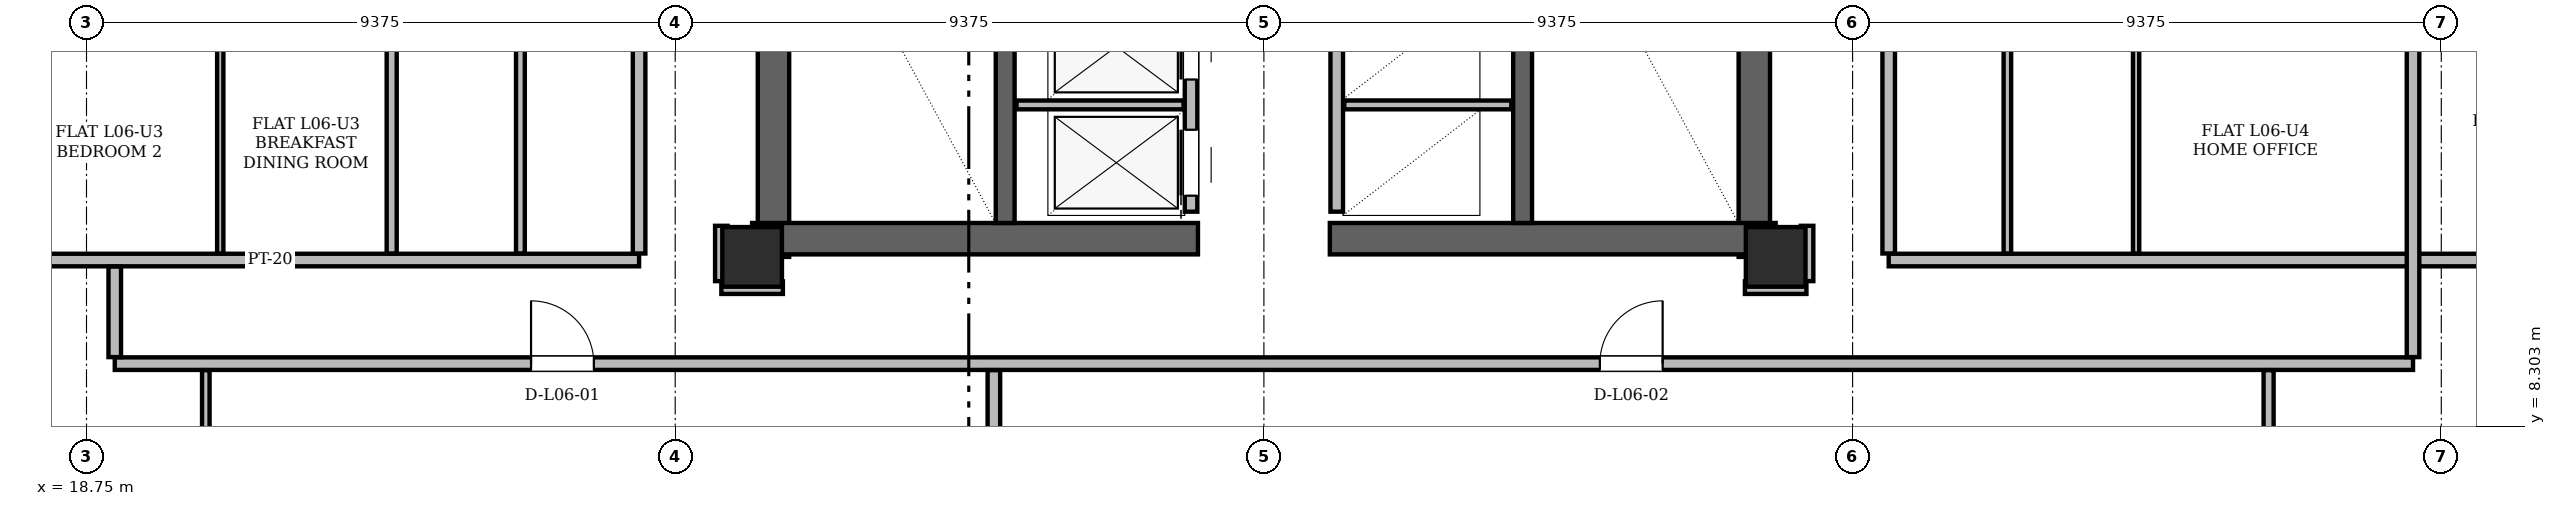
"""IFC4 building model, lengths in metres.
Left out: names, types, materials, properties, quantities, classifications, styles, units other than length and angle.
Written with IfcOpenShell. Run it as: python <this file> out.ifc"""

import sys

from ifc_helpers import new_model, si_unit, direction, frame, frame_2d, origin, origin_2d, place, context, subcontext, project, spatial, rectangle, hollow_rectangle, extrude, element, fill, save


model = new_model("IFC4")
c1 = context("Model", 3, precision=1e-05, world=origin(), true_north=direction((0.0, 1.0)))
c2 = subcontext(c1, "Body", "Model", "MODEL_VIEW")
j1 = project(units=[si_unit("LENGTHUNIT", "METRE"), si_unit("PLANEANGLEUNIT", "RADIAN")], contexts=[c1])
p1 = place(None, origin())
s1 = spatial("IfcSite", under=j1, at=p1, CompositionType="ELEMENT")
p2 = place(p1, origin())
s2 = spatial("IfcBuilding", under=s1, at=p2, CompositionType="ELEMENT")
p3 = place(p2, frame((0.0, 0.0, 27.3)))
s3 = spatial("IfcBuildingStorey", under=s2, at=p3, CompositionType="ELEMENT", Elevation=27.3)
for number, where, z_axis, x_axis in (
    (1, (29.35, 11.0, 0.0), (0.0, 0.0, 1.0), (1.0, 0.0, 0.0)),
    (2, (45.65, 11.0, 0.0), (0.0, 0.0, 1.0), (1.0, 0.0, 0.0)),
):
    element("IfcColumn", number, at=place(p3, frame(where, z_axis=z_axis, x_axis=x_axis)), inside=s3, PredefinedType="COLUMN", context=c2, shape_type="SweptSolid", body=[
        extrude(hollow_rectangle(XDim=0.95, YDim=0.95, WallThickness=0.08, at=origin_2d()), origin(), (0.0, 0.0, 1.0), 3.6),
    ])
for number, where, z_axis, x_axis in (
    (3, (29.69, 11.0, 0.0), (0.0, 0.0, 1.0), (0.0, 1.0, 0.0)),
    (4, (45.31, 11.0, 0.0), (0.0, 0.0, 1.0), (0.0, 1.0, 0.0)),
):
    element("IfcWall", number, at=place(p3, frame(where, z_axis=z_axis, x_axis=x_axis)), inside=s3, PredefinedType="SHEAR", context=c2, shape_type="SweptSolid", body=[
        extrude(rectangle(XDim=13.3, YDim=0.5, at=frame_2d((6.65, 0.0))), origin(), (0.0, 0.0, 1.0), 3.36),
    ])
for number, where, z_axis, x_axis in (
    (5, (29.35, 11.29, 0.0), (0.0, 0.0, 1.0), (1.0, 0.0, 0.0)),
    (6, (38.55, 11.29, 0.0), (0.0, 0.0, 1.0), (1.0, 0.0, 0.0)),
):
    element("IfcWall", number, at=place(p3, frame(where, z_axis=z_axis, x_axis=x_axis)), inside=s3, PredefinedType="SHEAR", context=c2, shape_type="SweptSolid", body=[
        extrude(rectangle(XDim=7.1, YDim=0.5, at=frame_2d((3.55, 0.0))), origin(), (0.0, 0.0, 1.0), 3.36),
    ])
for number, where, z_axis, x_axis in (
    (7, (33.38, 11.54, 0.0), (0.0, 0.0, 1.0), (0.0, 1.0, 0.0)),
    (8, (41.62, 11.54, 0.0), (0.0, 0.0, 1.0), (0.0, 1.0, 0.0)),
):
    element("IfcWall", number, at=place(p3, frame(where, z_axis=z_axis, x_axis=x_axis)), inside=s3, PredefinedType="SHEAR", context=c2, shape_type="SweptSolid", body=[
        extrude(rectangle(XDim=7.62, YDim=0.3, at=frame_2d((3.81, 0.0))), origin(), (0.0, 0.0, 1.0), 3.36),
    ])
p4 = place(p3, frame((13.09, 15.3, 0.0), z_axis=(0.0, 0.0, 1.0), x_axis=(0.500005168208, -0.866022419898, 0.0)))
e9 = element("IfcWall", 9, at=p4, inside=s3, PredefinedType="SOLIDWALL", context=c2, shape_type="SweptSolid", body=[
    extrude(rectangle(XDim=16.096, YDim=0.34, at=frame_2d((8.048, 0.0))), origin(), (0.0, 0.0, 1.0), 2.494),
])
p5 = place(p4, frame((1.49, 0.0, 1.28)))
e10 = element("IfcOpeningElement", 10, at=p5, cuts=e9, PredefinedType="OPENING", context=c2, shape_type="SweptSolid", body=[
    extrude(rectangle(XDim=0.85, YDim=0.92, at=frame_2d((0.425, 0.46))), frame((0.0, 0.17, 0.0), z_axis=(0.0, -1.0, 0.0), x_axis=(1.0, 0.0, 0.0)), (0.0, 0.0, 1.0), 0.34),
])
p6 = place(p3, frame((53.862, 1.36, 0.0), z_axis=(0.0, 0.0, 1.0), x_axis=(0.500005168208, 0.866022419898, 0.0)))
e11 = element("IfcWall", 11, at=p6, inside=s3, PredefinedType="SOLIDWALL", context=c2, shape_type="SweptSolid", body=[
    extrude(rectangle(XDim=16.096, YDim=0.34, at=frame_2d((8.048, 0.0))), origin(), (0.0, 0.0, 1.0), 2.494),
])
p7 = place(p3, frame((36.34, 11.72, 0.0), z_axis=(0.0, 0.0, 1.0), x_axis=(0.0, 1.0, 0.0)))
e12 = element("IfcWall", 12, at=p7, inside=s3, PredefinedType="PARTITIONING", context=c2, shape_type="SweptSolid", body=[
    extrude(rectangle(XDim=7.6, YDim=0.2, at=frame_2d((3.8, 0.0))), origin(), (0.0, 0.0, 1.0), 3.36),
])
p8 = place(p7, frame((0.255, 0.0, 0.0)))
e13 = element("IfcOpeningElement", 13, at=p8, cuts=e12, PredefinedType="OPENING", context=c2, shape_type="SweptSolid", body=[
    extrude(rectangle(XDim=1.05, YDim=2.15, at=frame_2d((0.525, 1.075))), frame((0.0, 0.1, 0.0), z_axis=(0.0, -1.0, 0.0), x_axis=(1.0, 0.0, 0.0)), (0.0, 0.0, 1.0), 0.2),
])
p9 = place(p7, frame((2.105, 0.0, 0.0)))
e14 = element("IfcOpeningElement", 14, at=p9, cuts=e12, PredefinedType="OPENING", context=c2, shape_type="SweptSolid", body=[
    extrude(rectangle(XDim=1.05, YDim=2.15, at=frame_2d((0.525, 1.075))), frame((0.0, 0.1, 0.0), z_axis=(0.0, -1.0, 0.0), x_axis=(1.0, 0.0, 0.0)), (0.0, 0.0, 1.0), 0.2),
])
p10 = place(p7, frame((3.955, 0.0, 0.0)))
e15 = element("IfcOpeningElement", 15, at=p10, cuts=e12, PredefinedType="OPENING", context=c2, shape_type="SweptSolid", body=[
    extrude(rectangle(XDim=1.05, YDim=2.15, at=frame_2d((0.525, 1.075))), frame((0.0, 0.1, 0.0), z_axis=(0.0, -1.0, 0.0), x_axis=(1.0, 0.0, 0.0)), (0.0, 0.0, 1.0), 0.2),
])
p11 = place(p3, frame((33.56, 13.42, 0.0), z_axis=(0.0, 0.0, 1.0), x_axis=(1.0, 0.0, 0.0)))
e16 = element("IfcWall", 16, at=p11, inside=s3, PredefinedType="PARTITIONING", context=c2, shape_type="SweptSolid", body=[
    extrude(rectangle(XDim=2.66, YDim=0.14, at=frame_2d((1.33, 0.0))), origin(), (0.0, 0.0, 1.0), 3.36),
])
p12 = place(p3, frame((38.66, 11.72, 0.0), z_axis=(0.0, 0.0, 1.0), x_axis=(0.0, 1.0, 0.0)))
e17 = element("IfcWall", 17, at=p12, inside=s3, PredefinedType="PARTITIONING", context=c2, shape_type="SweptSolid", body=[
    extrude(rectangle(XDim=9.1, YDim=0.2, at=frame_2d((4.55, 0.0))), origin(), (0.0, 0.0, 1.0), 3.36),
])
p13 = place(p3, frame((38.78, 13.42, 0.0), z_axis=(0.0, 0.0, 1.0), x_axis=(1.0, 0.0, 0.0)))
e18 = element("IfcWall", 18, at=p13, inside=s3, PredefinedType="PARTITIONING", context=c2, shape_type="SweptSolid", body=[
    extrude(rectangle(XDim=2.66, YDim=0.14, at=frame_2d((1.33, 0.0))), origin(), (0.0, 0.0, 1.0), 3.36),
])
p14 = place(p3, frame((19.2, 9.3, 0.0), z_axis=(0.0, 0.0, 1.0), x_axis=(1.0, 0.0, 0.0)))
e19 = element("IfcWall", 19, at=p14, inside=s3, PredefinedType="PARTITIONING", context=c2, shape_type="SweptSolid", body=[
    extrude(rectangle(XDim=36.6, YDim=0.2, at=frame_2d((18.3, 0.0))), origin(), (0.0, 0.0, 1.0), 2.738),
])
p15 = place(p14, frame((6.629, 0.0, 0.0)))
e20 = element("IfcOpeningElement", 20, at=p15, cuts=e19, PredefinedType="OPENING", context=c2, shape_type="SweptSolid", body=[
    extrude(rectangle(XDim=1.0, YDim=2.18, at=frame_2d((0.5, 1.09))), frame((0.0, 0.1, 0.0), z_axis=(0.0, -1.0, 0.0), x_axis=(1.0, 0.0, 0.0)), (0.0, 0.0, 1.0), 0.2),
])
p16 = place(p14, frame((23.65, 0.0, 0.0)))
e21 = element("IfcOpeningElement", 21, at=p16, cuts=e19, PredefinedType="OPENING", context=c2, shape_type="SweptSolid", body=[
    extrude(rectangle(XDim=1.0, YDim=2.18, at=frame_2d((0.5, 1.09))), frame((0.0, 0.1, 0.0), z_axis=(0.0, -1.0, 0.0), x_axis=(1.0, 0.0, 0.0)), (0.0, 0.0, 1.0), 0.2),
])
for number, where, z_axis, x_axis in (
    (22, (28.86, 10.51, 0.0), (0.0, 0.0, 1.0), (1.0, 0.0, 0.0)),
    (23, (45.16, 10.51, 0.0), (0.0, 0.0, 1.0), (1.0, 0.0, 0.0)),
):
    element("IfcWall", number, at=place(p3, frame(where, z_axis=z_axis, x_axis=x_axis)), inside=s3, PredefinedType="PARTITIONING", context=c2, shape_type="SweptSolid", body=[
        extrude(rectangle(XDim=0.98, YDim=0.2, at=frame_2d((0.49, 0.0))), origin(), (0.0, 0.0, 1.0), 2.738),
    ])
for number, where, z_axis, x_axis in (
    (24, (15.802, 10.95, 0.0), (0.0, 0.0, 1.0), (1.0, 0.0, 0.0)),
    (25, (47.45, 10.95, 0.0), (0.0, 0.0, 1.0), (1.0, 0.0, 0.0)),
):
    element("IfcWall", number, at=place(p3, frame(where, z_axis=z_axis, x_axis=x_axis)), inside=s3, PredefinedType="PARTITIONING", context=c2, shape_type="SweptSolid", body=[
        extrude(rectangle(XDim=11.748, YDim=0.2, at=frame_2d((5.874, 0.0))), origin(), (0.0, 0.0, 1.0), 3.36),
    ])
p17 = place(p3, frame((19.2, 9.404, 0.0), z_axis=(0.0, 0.0, 1.0), x_axis=(0.0, 1.0, 0.0)))
e26 = element("IfcWall", 26, at=p17, inside=s3, PredefinedType="PARTITIONING", context=c2, shape_type="SweptSolid", body=[
    extrude(rectangle(XDim=1.442, YDim=0.2, at=frame_2d((0.721, 0.0))), origin(), (0.0, 0.0, 1.0), 3.36),
])
p18 = place(p3, frame((20.65, 2.553, 0.0), z_axis=(0.0, 0.0, 1.0), x_axis=(0.0, 1.0, 0.0)))
e27 = element("IfcWall", 27, at=p18, inside=s3, PredefinedType="PARTITIONING", context=c2, shape_type="SweptSolid", body=[
    extrude(rectangle(XDim=6.643, YDim=0.12, at=frame_2d((3.322, 0.0))), origin(), (0.0, 0.0, 1.0), 3.36),
])
p19 = place(p18, frame((2.904, 0.0, 0.0)))
e28 = element("IfcOpeningElement", 28, at=p19, cuts=e27, PredefinedType="OPENING", context=c2, shape_type="SweptSolid", body=[
    extrude(rectangle(XDim=0.88, YDim=2.08, at=frame_2d((0.44, 1.04))), frame((0.0, 0.06, 0.0), z_axis=(0.0, -1.0, 0.0), x_axis=(1.0, 0.0, 0.0)), (0.0, 0.0, 1.0), 0.12),
])
p20 = place(p3, frame((20.88, 11.054, 0.0), z_axis=(0.0, 0.0, 1.0), x_axis=(0.0, 1.0, 0.0)))
e29 = element("IfcWall", 29, at=p20, inside=s3, PredefinedType="PARTITIONING", context=c2, shape_type="SweptSolid", body=[
    extrude(rectangle(XDim=4.642, YDim=0.1, at=frame_2d((2.321, 0.0))), origin(), (0.0, 0.0, 1.0), 2.738),
])
p21 = place(p3, frame((23.61, 11.054, 0.0), z_axis=(0.0, 0.0, 1.0), x_axis=(0.0, 1.0, 0.0)))
e30 = element("IfcWall", 30, at=p21, inside=s3, PredefinedType="PARTITIONING", context=c2, shape_type="SweptSolid", body=[
    extrude(rectangle(XDim=4.642, YDim=0.16, at=frame_2d((2.321, 0.0))), origin(), (0.0, 0.0, 1.0), 2.738),
])
p22 = place(p3, frame((25.66, 11.054, 0.0), z_axis=(0.0, 0.0, 1.0), x_axis=(0.0, 1.0, 0.0)))
e31 = element("IfcWall", 31, at=p22, inside=s3, PredefinedType="PARTITIONING", context=c2, shape_type="SweptSolid", body=[
    extrude(rectangle(XDim=4.642, YDim=0.14, at=frame_2d((2.321, 0.0))), origin(), (0.0, 0.0, 1.0), 2.738),
])
p23 = place(p3, frame((27.55, 11.054, 0.0), z_axis=(0.0, 0.0, 1.0), x_axis=(0.0, 1.0, 0.0)))
e32 = element("IfcWall", 32, at=p23, inside=s3, PredefinedType="PARTITIONING", context=c2, shape_type="SweptSolid", body=[
    extrude(rectangle(XDim=14.812, YDim=0.2, at=frame_2d((7.406, 0.0))), origin(), (0.0, 0.0, 1.0), 2.738),
])
p24 = place(p23, frame((8.541, 0.0, 0.0)))
e33 = element("IfcOpeningElement", 33, at=p24, cuts=e32, PredefinedType="OPENING", context=c2, shape_type="SweptSolid", body=[
    extrude(rectangle(XDim=1.0, YDim=2.18, at=frame_2d((0.5, 1.09))), frame((0.0, 0.1, 0.0), z_axis=(0.0, -1.0, 0.0), x_axis=(1.0, 0.0, 0.0)), (0.0, 0.0, 1.0), 0.2),
])
p25 = place(p3, frame((28.86, 10.614, 0.0), z_axis=(0.0, 0.0, 1.0), x_axis=(0.0, 1.0, 0.0)))
e34 = element("IfcWall", 34, at=p25, inside=s3, PredefinedType="PARTITIONING", context=c2, shape_type="SweptSolid", body=[
    extrude(rectangle(XDim=0.881, YDim=0.2, at=frame_2d((0.44, 0.0))), origin(), (0.0, 0.0, 1.0), 2.738),
])
p26 = place(p3, frame((33.2, 1.534, 0.0), z_axis=(0.0, 0.0, 1.0), x_axis=(0.0, 1.0, 0.0)))
e35 = element("IfcWall", 35, at=p26, inside=s3, PredefinedType="PARTITIONING", context=c2, shape_type="SweptSolid", body=[
    extrude(rectangle(XDim=7.662, YDim=0.2, at=frame_2d((3.831, 0.0))), origin(), (0.0, 0.0, 1.0), 2.946),
])
p27 = place(p3, frame((46.15, 10.614, 0.0), z_axis=(0.0, 0.0, 1.0), x_axis=(0.0, 1.0, 0.0)))
e36 = element("IfcWall", 36, at=p27, inside=s3, PredefinedType="PARTITIONING", context=c2, shape_type="SweptSolid", body=[
    extrude(rectangle(XDim=0.881, YDim=0.2, at=frame_2d((0.44, 0.0))), origin(), (0.0, 0.0, 1.0), 2.738),
])
p28 = place(p3, frame((47.45, 11.054, 0.0), z_axis=(0.0, 0.0, 1.0), x_axis=(0.0, 1.0, 0.0)))
e37 = element("IfcWall", 37, at=p28, inside=s3, PredefinedType="PARTITIONING", context=c2, shape_type="SweptSolid", body=[
    extrude(rectangle(XDim=14.812, YDim=0.2, at=frame_2d((7.406, 0.0))), origin(), (0.0, 0.0, 1.0), 2.738),
])
p29 = place(p28, frame((8.541, 0.0, 0.0)))
e38 = element("IfcOpeningElement", 38, at=p29, cuts=e37, PredefinedType="OPENING", context=c2, shape_type="SweptSolid", body=[
    extrude(rectangle(XDim=1.0, YDim=2.18, at=frame_2d((0.5, 1.09))), frame((0.0, 0.1, 0.0), z_axis=(0.0, -1.0, 0.0), x_axis=(1.0, 0.0, 0.0)), (0.0, 0.0, 1.0), 0.2),
])
p30 = place(p3, frame((49.34, 11.054, 0.0), z_axis=(0.0, 0.0, 1.0), x_axis=(0.0, 1.0, 0.0)))
e39 = element("IfcWall", 39, at=p30, inside=s3, PredefinedType="PARTITIONING", context=c2, shape_type="SweptSolid", body=[
    extrude(rectangle(XDim=4.652, YDim=0.12, at=frame_2d((2.326, 0.0))), origin(), (0.0, 0.0, 1.0), 2.738),
])
p31 = place(p3, frame((51.39, 11.054, 0.0), z_axis=(0.0, 0.0, 1.0), x_axis=(0.0, 1.0, 0.0)))
e40 = element("IfcWall", 40, at=p31, inside=s3, PredefinedType="PARTITIONING", context=c2, shape_type="SweptSolid", body=[
    extrude(rectangle(XDim=4.652, YDim=0.1, at=frame_2d((2.326, 0.0))), origin(), (0.0, 0.0, 1.0), 2.738),
])
p32 = place(p3, frame((53.5, 1.828, 0.0), z_axis=(0.0, 0.0, 1.0), x_axis=(0.0, 1.0, 0.0)))
e41 = element("IfcWall", 41, at=p32, inside=s3, PredefinedType="PARTITIONING", context=c2, shape_type="SweptSolid", body=[
    extrude(rectangle(XDim=7.368, YDim=0.16, at=frame_2d((3.684, 0.0))), origin(), (0.0, 0.0, 1.0), 2.738),
])
p33 = place(p32, frame((3.137, 0.0, 0.0)))
e42 = element("IfcOpeningElement", 42, at=p33, cuts=e41, PredefinedType="OPENING", context=c2, shape_type="SweptSolid", body=[
    extrude(rectangle(XDim=0.88, YDim=2.08, at=frame_2d((0.44, 1.04))), frame((0.0, 0.08, 0.0), z_axis=(0.0, -1.0, 0.0), x_axis=(1.0, 0.0, 0.0)), (0.0, 0.0, 1.0), 0.16),
])
p34 = place(p3, frame((55.8, 9.404, 0.0), z_axis=(0.0, 0.0, 1.0), x_axis=(0.0, 1.0, 0.0)))
e43 = element("IfcWall", 43, at=p34, inside=s3, PredefinedType="PARTITIONING", context=c2, shape_type="SweptSolid", body=[
    extrude(rectangle(XDim=6.302, YDim=0.2, at=frame_2d((3.151, 0.0))), origin(), (0.0, 0.0, 1.0), 2.738),
])
p35 = place(p8, origin())
e44 = element("IfcDoor", 44, at=p35, inside=s3, OperationType="SLIDING_TO_LEFT", PredefinedType="DOOR", context=c2, shape_type="SweptSolid", body=[
    extrude(rectangle(XDim=1.05, YDim=2.15, at=frame_2d((0.525, 1.075))), frame((0.0, 0.025, 0.0), z_axis=(0.0, -1.0, 0.0), x_axis=(1.0, 0.0, 0.0)), (0.0, 0.0, 1.0), 0.05),
])
fill(e13, e44)
p36 = place(p9, origin())
e45 = element("IfcDoor", 45, at=p36, inside=s3, OperationType="SLIDING_TO_RIGHT", PredefinedType="DOOR", context=c2, shape_type="SweptSolid", body=[
    extrude(rectangle(XDim=1.05, YDim=2.15, at=frame_2d((0.525, 1.075))), frame((0.0, 0.025, 0.0), z_axis=(0.0, -1.0, 0.0), x_axis=(1.0, 0.0, 0.0)), (0.0, 0.0, 1.0), 0.05),
])
fill(e14, e45)
p37 = place(p15, origin())
e46 = element("IfcDoor", 46, at=p37, inside=s3, OperationType="SINGLE_SWING_LEFT", PredefinedType="DOOR", context=c2, shape_type="SweptSolid", body=[
    extrude(rectangle(XDim=1.0, YDim=2.18, at=frame_2d((0.5, 1.09))), frame((0.0, 0.025, 0.0), z_axis=(0.0, -1.0, 0.0), x_axis=(1.0, 0.0, 0.0)), (0.0, 0.0, 1.0), 0.05),
])
fill(e20, e46)
p38 = place(p16, origin())
e47 = element("IfcDoor", 47, at=p38, inside=s3, OperationType="SINGLE_SWING_RIGHT", PredefinedType="DOOR", context=c2, shape_type="SweptSolid", body=[
    extrude(rectangle(XDim=1.0, YDim=2.18, at=frame_2d((0.5, 1.09))), frame((0.0, 0.025, 0.0), z_axis=(0.0, -1.0, 0.0), x_axis=(1.0, 0.0, 0.0)), (0.0, 0.0, 1.0), 0.05),
])
fill(e21, e47)
save(model, sys.argv[1])
